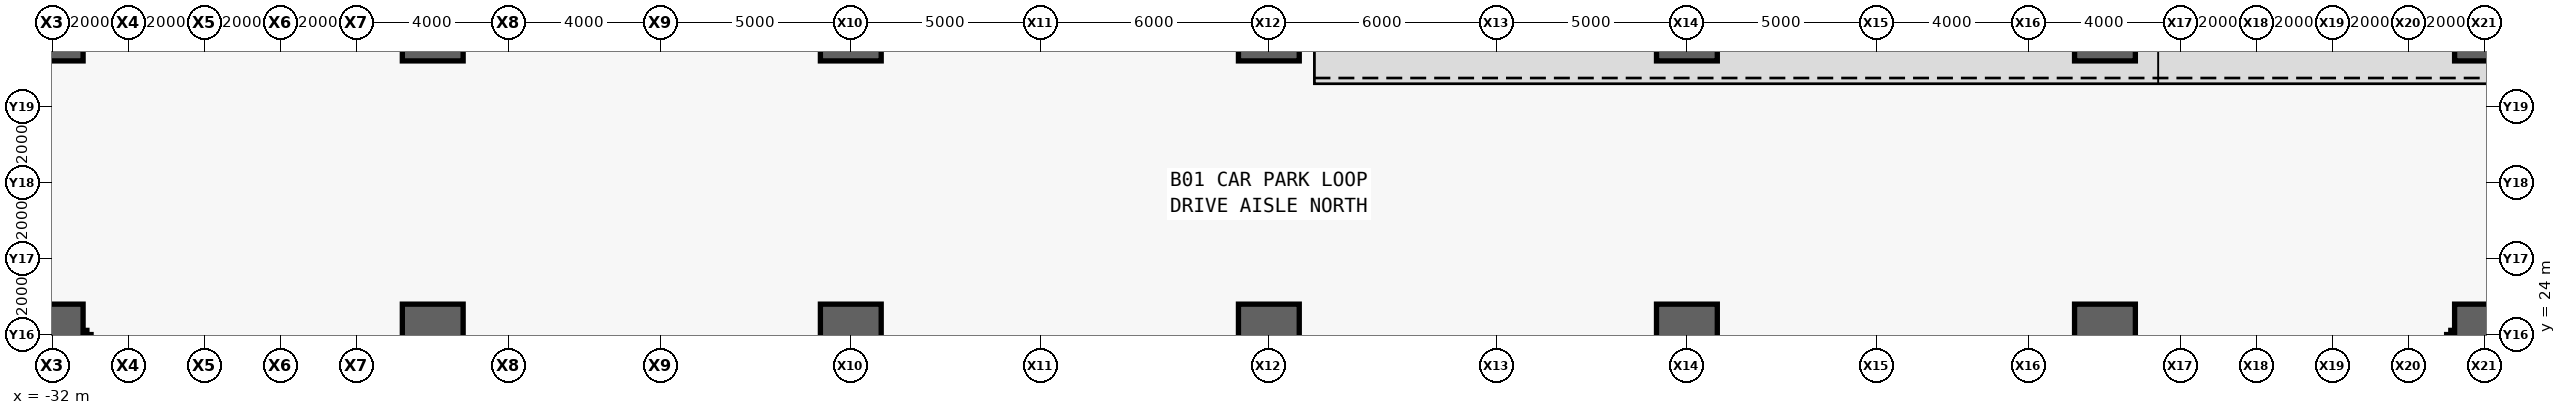
"""IFC4 building model, lengths in metres.
Left out: names, types, materials, properties, quantities, classifications, styles, units other than length and angle.
Written with IfcOpenShell. Run it as: python <this file> out.ifc"""

import sys

from ifc_helpers import new_model, si_unit, direction, frame, frame_2d, origin, origin_2d, place, context, subcontext, project, spatial, rectangle, extrude, source, transform, mapped, element, save


model = new_model("IFC4")
c1 = context("Model", 3, precision=1e-05, world=origin(), true_north=direction((0.0, 1.0)))
c2 = subcontext(c1, "Body", "Model", "MODEL_VIEW")
j1 = project(units=[si_unit("LENGTHUNIT", "METRE"), si_unit("PLANEANGLEUNIT", "RADIAN")], contexts=[c1])
p1 = place(None, origin())
s1 = spatial("IfcSite", under=j1, at=p1, CompositionType="ELEMENT")
p2 = place(p1, origin())
s2 = spatial("IfcBuilding", under=s1, at=p2, CompositionType="ELEMENT")
p3 = place(p2, frame((0.0, 0.0, -4.8)))
s3 = spatial("IfcBuildingStorey", under=s2, at=p3, CompositionType="ELEMENT", Elevation=-4.8)
m1 = source(origin(), c2, "Body", "SweptSolid", [
    extrude(rectangle(XDim=1.6, YDim=1.6, at=origin_2d()), origin(), (0.0, 0.0, 1.0), 4.8),
])
for number, where, z_axis, x_axis in (
    (1, (-32.0, 24.0, 0.0), (0.0, 0.0, 1.0), (1.0, 0.0, 0.0)),
    (2, (-32.0, 32.0, 0.0), (0.0, 0.0, 1.0), (1.0, 0.0, 0.0)),
    (3, (-22.0, 24.0, 0.0), (0.0, 0.0, 1.0), (1.0, 0.0, 0.0)),
    (4, (-22.0, 32.0, 0.0), (0.0, 0.0, 1.0), (1.0, 0.0, 0.0)),
    (5, (-11.0, 24.0, 0.0), (0.0, 0.0, 1.0), (1.0, 0.0, 0.0)),
    (6, (-11.0, 32.0, 0.0), (0.0, 0.0, 1.0), (1.0, 0.0, 0.0)),
    (7, (0.0, 24.0, 0.0), (0.0, 0.0, 1.0), (1.0, 0.0, 0.0)),
    (8, (0.0, 32.0, 0.0), (0.0, 0.0, 1.0), (1.0, 0.0, 0.0)),
    (9, (11.0, 24.0, 0.0), (0.0, 0.0, 1.0), (1.0, 0.0, 0.0)),
    (10, (11.0, 32.0, 0.0), (0.0, 0.0, 1.0), (1.0, 0.0, 0.0)),
    (11, (22.0, 24.0, 0.0), (0.0, 0.0, 1.0), (1.0, 0.0, 0.0)),
    (12, (22.0, 32.0, 0.0), (0.0, 0.0, 1.0), (1.0, 0.0, 0.0)),
    (13, (32.0, 24.0, 0.0), (0.0, 0.0, 1.0), (1.0, 0.0, 0.0)),
    (14, (32.0, 32.0, 0.0), (0.0, 0.0, 1.0), (1.0, 0.0, 0.0)),
):
    element("IfcColumn", number, at=place(p3, frame(where, z_axis=z_axis, x_axis=x_axis)), inside=s3, PredefinedType="COLUMN", context=c2, shape_type="MappedRepresentation", body=[
        mapped(m1, transform((0.0, 0.0, 0.0), scale=1.0)),
    ])
m2 = source(origin(), c2, "Body", "SweptSolid", [
    extrude(rectangle(XDim=48.0, YDim=0.22, at=frame_2d((24.0, 0.0))), origin(), (0.0, 0.0, 1.0), 4.48),
])
p4 = place(p3, frame((-31.1, -24.0, 0.0), z_axis=(0.0, 0.0, 1.0), x_axis=(0.0, 1.0, 0.0)))
e15 = element("IfcWall", 15, at=p4, inside=s3, PredefinedType="PARTITIONING", context=c2, shape_type="MappedRepresentation", body=[
    mapped(m2, transform((0.0, 0.0, 0.0), scale=1.0)),
])
m3 = source(origin(), c2, "Body", "SweptSolid", [
    extrude(rectangle(XDim=1.5, YDim=2.3, at=frame_2d((0.75, 1.15))), frame((0.0, 0.12, 0.0), z_axis=(0.0, -1.0, 0.0), x_axis=(1.0, 0.0, 0.0)), (0.0, 0.0, 1.0), 0.24),
])
p5 = place(p4, frame((6.25, 0.0, 0.0)))
e16 = element("IfcOpeningElement", 16, at=p5, cuts=e15, PredefinedType="OPENING", context=c2, shape_type="MappedRepresentation", body=[
    mapped(m3, transform((0.0, 0.0, 0.0), scale=1.0)),
])
p6 = place(p4, frame((28.75, 0.0, 0.0)))
e17 = element("IfcOpeningElement", 17, at=p6, cuts=e15, PredefinedType="OPENING", context=c2, shape_type="MappedRepresentation", body=[
    mapped(m3, transform((0.0, 0.0, 0.0), scale=1.0)),
])
p7 = place(p4, frame((40.25, 0.0, 0.0)))
e18 = element("IfcOpeningElement", 18, at=p7, cuts=e15, PredefinedType="OPENING", context=c2, shape_type="MappedRepresentation", body=[
    mapped(m3, transform((0.0, 0.0, 0.0), scale=1.0)),
])
m4 = source(origin(), c2, "Body", "SweptSolid", [
    extrude(rectangle(XDim=14.7, YDim=0.22, at=frame_2d((7.35, 0.0))), origin(), (0.0, 0.0, 1.0), 2.68),
])
p8 = place(p3, frame((-45.8, 24.0, 0.0), z_axis=(0.0, 0.0, 1.0), x_axis=(1.0, 0.0, 0.0)))
e19 = element("IfcWall", 19, at=p8, inside=s3, PredefinedType="PARTITIONING", context=c2, shape_type="MappedRepresentation", body=[
    mapped(m4, transform((0.0, 0.0, 0.0), scale=1.0)),
])
p9 = place(p3, frame((31.1, -24.0, 0.0), z_axis=(0.0, 0.0, 1.0), x_axis=(0.0, 1.0, 0.0)))
e20 = element("IfcWall", 20, at=p9, inside=s3, PredefinedType="PARTITIONING", context=c2, shape_type="MappedRepresentation", body=[
    mapped(m2, transform((0.0, 0.0, 0.0), scale=1.0)),
])
p10 = place(p9, frame((6.25, 0.0, 0.0)))
e21 = element("IfcOpeningElement", 21, at=p10, cuts=e20, PredefinedType="OPENING", context=c2, shape_type="MappedRepresentation", body=[
    mapped(m3, transform((0.0, 0.0, 0.0), scale=1.0)),
])
p11 = place(p9, frame((40.25, 0.0, 0.0)))
e22 = element("IfcOpeningElement", 22, at=p11, cuts=e20, PredefinedType="OPENING", context=c2, shape_type="MappedRepresentation", body=[
    mapped(m3, transform((0.0, 0.0, 0.0), scale=1.0)),
])
p12 = place(p3, frame((31.1, 24.0, 0.0), z_axis=(0.0, 0.0, 1.0), x_axis=(1.0, 0.0, 0.0)))
e23 = element("IfcWall", 23, at=p12, inside=s3, PredefinedType="PARTITIONING", context=c2, shape_type="MappedRepresentation", body=[
    mapped(m4, transform((0.0, 0.0, 0.0), scale=1.0)),
])
save(model, sys.argv[1])
